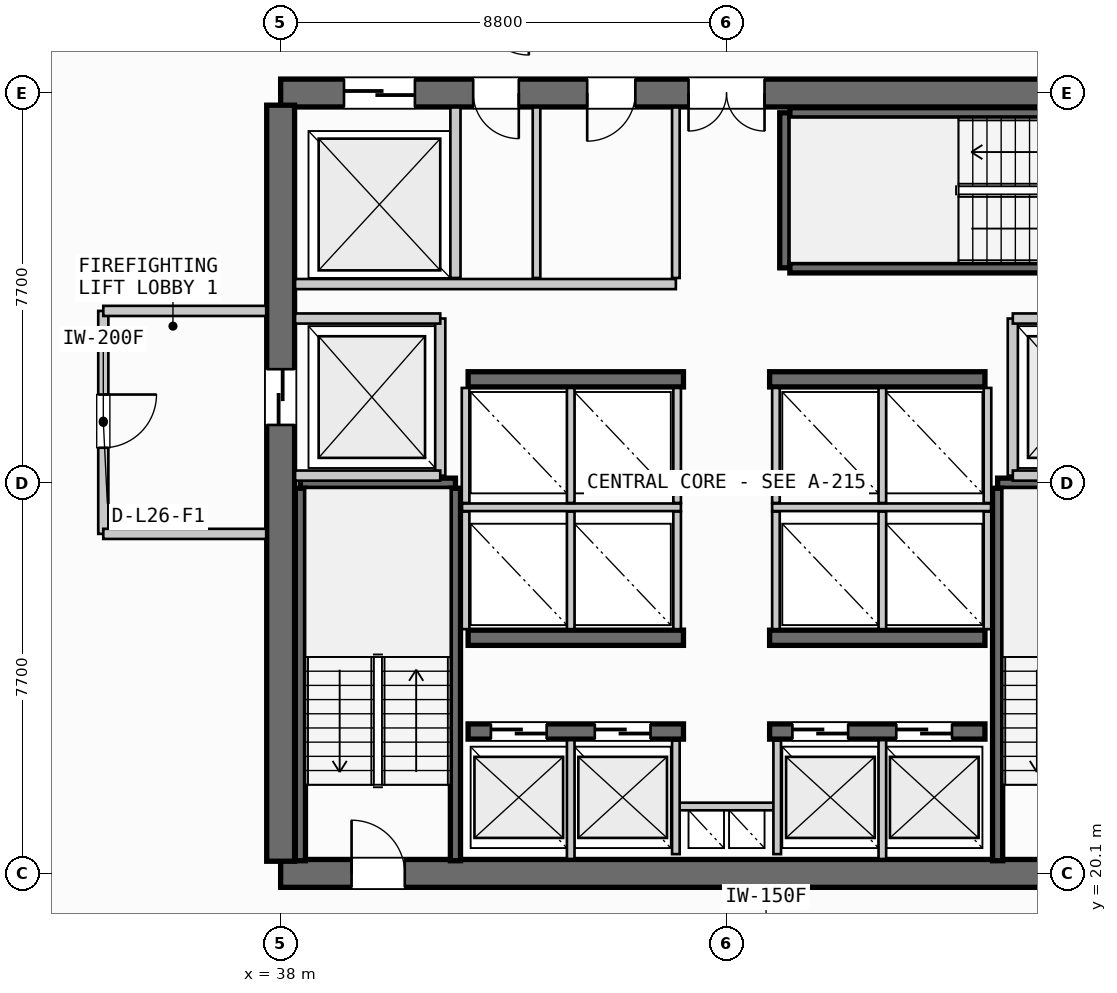
"""IFC4 building model, lengths in metres.
Left out: names, types, materials, properties, quantities, classifications, styles, units other than length and angle.
Written with IfcOpenShell. Run it as: python <this file> out.ifc"""

import sys

from ifc_helpers import new_model, si_unit, direction, frame, frame_2d, origin, place, context, subcontext, project, spatial, rectangle, extrude, source, transform, mapped, element, fill, save


model = new_model("IFC4")
c1 = context("Model", 3, precision=1e-05, world=origin(), true_north=direction((0.0, 1.0)))
c2 = subcontext(c1, "Body", "Model", "MODEL_VIEW")
j1 = project(units=[si_unit("LENGTHUNIT", "METRE"), si_unit("PLANEANGLEUNIT", "RADIAN")], contexts=[c1])
p1 = place(None, origin())
s1 = spatial("IfcSite", under=j1, at=p1, CompositionType="ELEMENT")
p2 = place(p1, origin())
s2 = spatial("IfcBuilding", under=s1, at=p2, CompositionType="ELEMENT")
p3 = place(p2, frame((0.0, 0.0, 107.2)))
s3 = spatial("IfcBuildingStorey", under=s2, at=p3, CompositionType="ELEMENT", Elevation=107.2)
p4 = place(p3, frame((38.0, 20.1, 0.0), z_axis=(0.0, 0.0, 1.0), x_axis=(1.0, 0.0, 0.0)))
e1 = element("IfcWall", 1, at=p4, inside=s3, PredefinedType="SHEAR", context=c2, shape_type="SweptSolid", body=[
    extrude(rectangle(XDim=17.6, YDim=0.55, at=frame_2d((8.8, 0.0))), origin(), (0.0, 0.0, 1.0), 3.35),
])
p5 = place(p4, frame((1.4, 0.0, 0.0)))
e2 = element("IfcOpeningElement", 2, at=p5, cuts=e1, PredefinedType="OPENING", context=c2, shape_type="SweptSolid", body=[
    extrude(rectangle(XDim=1.05, YDim=2.15, at=frame_2d((0.525, 1.075))), frame((0.0, 0.285, 0.0), z_axis=(0.0, -1.0, 0.0), x_axis=(1.0, 0.0, 0.0)), (0.0, 0.0, 1.0), 0.57),
])
p6 = place(p4, frame((15.15, 0.0, 0.0)))
e3 = element("IfcOpeningElement", 3, at=p6, cuts=e1, PredefinedType="OPENING", context=c2, shape_type="SweptSolid", body=[
    extrude(rectangle(XDim=1.05, YDim=2.15, at=frame_2d((0.525, 1.075))), frame((0.0, 0.285, 0.0), z_axis=(0.0, -1.0, 0.0), x_axis=(1.0, 0.0, 0.0)), (0.0, 0.0, 1.0), 0.57),
])
p7 = place(p3, frame((55.6, 35.5, 0.0), z_axis=(0.0, 0.0, 1.0), x_axis=(-1.0, 0.0, 0.0)))
e4 = element("IfcWall", 4, at=p7, inside=s3, PredefinedType="SHEAR", context=c2, shape_type="SweptSolid", body=[
    extrude(rectangle(XDim=17.6, YDim=0.55, at=frame_2d((8.8, 0.0))), origin(), (0.0, 0.0, 1.0), 3.35),
])
p8 = place(p7, frame((8.05, 0.0, 0.0)))
e5 = element("IfcOpeningElement", 5, at=p8, cuts=e4, PredefinedType="OPENING", context=c2, shape_type="SweptSolid", body=[
    extrude(rectangle(XDim=1.5, YDim=2.2, at=frame_2d((0.75, 1.1))), frame((0.0, 0.285, 0.0), z_axis=(0.0, -1.0, 0.0), x_axis=(1.0, 0.0, 0.0)), (0.0, 0.0, 1.0), 0.57),
])
p9 = place(p7, frame((14.95, 0.0, 0.0)))
e6 = element("IfcOpeningElement", 6, at=p9, cuts=e4, PredefinedType="OPENING", context=c2, shape_type="SweptSolid", body=[
    extrude(rectangle(XDim=1.4, YDim=2.3, at=frame_2d((0.7, 1.15))), frame((0.0, 0.285, 0.0), z_axis=(0.0, -1.0, 0.0), x_axis=(1.0, 0.0, 0.0)), (0.0, 0.0, 1.0), 0.57),
])
p10 = place(p7, frame((12.9, 0.0, 0.0)))
e7 = element("IfcOpeningElement", 7, at=p10, cuts=e4, PredefinedType="OPENING", context=c2, shape_type="SweptSolid", body=[
    extrude(rectangle(XDim=0.9, YDim=2.15, at=frame_2d((0.45, 1.075))), frame((0.0, 0.285, 0.0), z_axis=(0.0, -1.0, 0.0), x_axis=(1.0, 0.0, 0.0)), (0.0, 0.0, 1.0), 0.57),
])
p11 = place(p7, frame((10.6, 0.0, 0.0)))
e8 = element("IfcOpeningElement", 8, at=p11, cuts=e4, PredefinedType="OPENING", context=c2, shape_type="SweptSolid", body=[
    extrude(rectangle(XDim=0.95, YDim=2.15, at=frame_2d((0.475, 1.075))), frame((0.0, 0.285, 0.0), z_axis=(0.0, -1.0, 0.0), x_axis=(1.0, 0.0, 0.0)), (0.0, 0.0, 1.0), 0.57),
])
p12 = place(p3, frame((38.0, 35.26, 0.0), z_axis=(0.0, 0.0, 1.0), x_axis=(0.0, -1.0, 0.0)))
e9 = element("IfcWall", 9, at=p12, inside=s3, PredefinedType="SHEAR", context=c2, shape_type="SweptSolid", body=[
    extrude(rectangle(XDim=14.92, YDim=0.55, at=frame_2d((7.46, 0.0))), origin(), (0.0, 0.0, 1.0), 3.35),
])
p13 = place(p12, frame((5.21, 0.0, 0.0)))
e10 = element("IfcOpeningElement", 10, at=p13, cuts=e9, PredefinedType="OPENING", context=c2, shape_type="SweptSolid", body=[
    extrude(rectangle(XDim=1.1, YDim=2.2, at=frame_2d((0.55, 1.1))), frame((0.0, 0.285, 0.0), z_axis=(0.0, -1.0, 0.0), x_axis=(1.0, 0.0, 0.0)), (0.0, 0.0, 1.0), 0.57),
])
p14 = place(p3, frame((41.7, 22.9, 0.0), z_axis=(0.0, 0.0, 1.0), x_axis=(1.0, 0.0, 0.0)))
e11 = element("IfcWall", 11, at=p14, inside=s3, PredefinedType="SHEAR", context=c2, shape_type="SweptSolid", body=[
    extrude(rectangle(XDim=4.25, YDim=0.3, at=frame_2d((2.125, 0.0))), origin(), (0.0, 0.0, 1.0), 3.35),
])
p15 = place(p14, frame((0.45, 0.0, 0.0)))
e12 = element("IfcOpeningElement", 12, at=p15, cuts=e11, PredefinedType="OPENING", context=c2, shape_type="SweptSolid", body=[
    extrude(rectangle(XDim=1.1, YDim=2.2, at=frame_2d((0.55, 1.1))), frame((0.0, 0.16, 0.0), z_axis=(0.0, -1.0, 0.0), x_axis=(1.0, 0.0, 0.0)), (0.0, 0.0, 1.0), 0.32),
])
p16 = place(p14, frame((2.5, 0.0, 0.0)))
e13 = element("IfcOpeningElement", 13, at=p16, cuts=e11, PredefinedType="OPENING", context=c2, shape_type="SweptSolid", body=[
    extrude(rectangle(XDim=1.1, YDim=2.2, at=frame_2d((0.55, 1.1))), frame((0.0, 0.16, 0.0), z_axis=(0.0, -1.0, 0.0), x_axis=(1.0, 0.0, 0.0)), (0.0, 0.0, 1.0), 0.32),
])
p17 = place(p3, frame((47.65, 22.9, 0.0), z_axis=(0.0, 0.0, 1.0), x_axis=(1.0, 0.0, 0.0)))
e14 = element("IfcWall", 14, at=p17, inside=s3, PredefinedType="SHEAR", context=c2, shape_type="SweptSolid", body=[
    extrude(rectangle(XDim=4.25, YDim=0.3, at=frame_2d((2.125, 0.0))), origin(), (0.0, 0.0, 1.0), 3.35),
])
p18 = place(p17, frame((0.45, 0.0, 0.0)))
e15 = element("IfcOpeningElement", 15, at=p18, cuts=e14, PredefinedType="OPENING", context=c2, shape_type="SweptSolid", body=[
    extrude(rectangle(XDim=1.1, YDim=2.2, at=frame_2d((0.55, 1.1))), frame((0.0, 0.16, 0.0), z_axis=(0.0, -1.0, 0.0), x_axis=(1.0, 0.0, 0.0)), (0.0, 0.0, 1.0), 0.32),
])
p19 = place(p17, frame((2.5, 0.0, 0.0)))
e16 = element("IfcOpeningElement", 16, at=p19, cuts=e14, PredefinedType="OPENING", context=c2, shape_type="SweptSolid", body=[
    extrude(rectangle(XDim=1.1, YDim=2.2, at=frame_2d((0.55, 1.1))), frame((0.0, 0.16, 0.0), z_axis=(0.0, -1.0, 0.0), x_axis=(1.0, 0.0, 0.0)), (0.0, 0.0, 1.0), 0.32),
])
for number, where, z_axis, x_axis in (
    (17, (41.7, 24.75, 0.0), (0.0, 0.0, 1.0), (1.0, 0.0, 0.0)),
    (18, (47.65, 24.75, 0.0), (0.0, 0.0, 1.0), (1.0, 0.0, 0.0)),
    (19, (41.7, 29.85, 0.0), (0.0, 0.0, 1.0), (1.0, 0.0, 0.0)),
    (20, (47.65, 29.85, 0.0), (0.0, 0.0, 1.0), (1.0, 0.0, 0.0)),
):
    element("IfcWall", number, at=place(p3, frame(where, z_axis=z_axis, x_axis=x_axis)), inside=s3, PredefinedType="SHEAR", context=c2, shape_type="SweptSolid", body=[
        extrude(rectangle(XDim=4.25, YDim=0.3, at=frame_2d((2.125, 0.0))), origin(), (0.0, 0.0, 1.0), 3.35),
    ])
p20 = place(p3, frame((38.39, 27.8, 0.0), z_axis=(0.0, 0.0, 1.0), x_axis=(1.0, 0.0, 0.0)))
e21 = element("IfcWall", 21, at=p20, inside=s3, PredefinedType="SHEAR", context=c2, shape_type="SweptSolid", body=[
    extrude(rectangle(XDim=3.06, YDim=0.2, at=frame_2d((1.53, 0.0))), origin(), (0.0, 0.0, 1.0), 3.35),
])
for number, where, z_axis, x_axis in (
    (22, (41.45, 27.7, 0.0), (0.0, 0.0, 1.0), (0.0, -1.0, 0.0)),
    (23, (38.39, 20.35, 0.0), (0.0, 0.0, 1.0), (0.0, 1.0, 0.0)),
):
    element("IfcWall", number, at=place(p3, frame(where, z_axis=z_axis, x_axis=x_axis)), inside=s3, PredefinedType="SHEAR", context=c2, shape_type="SweptSolid", body=[
        extrude(rectangle(XDim=7.35, YDim=0.2, at=frame_2d((3.675, 0.0))), origin(), (0.0, 0.0, 1.0), 3.35),
    ])
p21 = place(p3, frame((52.15, 27.8, 0.0), z_axis=(0.0, 0.0, 1.0), x_axis=(1.0, 0.0, 0.0)))
e24 = element("IfcWall", 24, at=p21, inside=s3, PredefinedType="SHEAR", context=c2, shape_type="SweptSolid", body=[
    extrude(rectangle(XDim=3.06, YDim=0.2, at=frame_2d((1.53, 0.0))), origin(), (0.0, 0.0, 1.0), 3.35),
])
p22 = place(p3, frame((52.15, 20.35, 0.0), z_axis=(0.0, 0.0, 1.0), x_axis=(0.0, 1.0, 0.0)))
e25 = element("IfcWall", 25, at=p22, inside=s3, PredefinedType="SHEAR", context=c2, shape_type="SweptSolid", body=[
    extrude(rectangle(XDim=7.35, YDim=0.2, at=frame_2d((3.675, 0.0))), origin(), (0.0, 0.0, 1.0), 3.35),
])
p23 = place(p3, frame((47.95, 32.05, 0.0), z_axis=(0.0, 0.0, 1.0), x_axis=(0.0, 1.0, 0.0)))
e26 = element("IfcWall", 26, at=p23, inside=s3, PredefinedType="SHEAR", context=c2, shape_type="SweptSolid", body=[
    extrude(rectangle(XDim=3.06, YDim=0.2, at=frame_2d((1.53, 0.0))), origin(), (0.0, 0.0, 1.0), 3.35),
])
for number, where, z_axis, x_axis in (
    (27, (48.05, 35.11, 0.0), (0.0, 0.0, 1.0), (1.0, 0.0, 0.0)),
    (28, (55.4, 32.05, 0.0), (0.0, 0.0, 1.0), (-1.0, 0.0, 0.0)),
):
    element("IfcWall", number, at=place(p3, frame(where, z_axis=z_axis, x_axis=x_axis)), inside=s3, PredefinedType="SHEAR", context=c2, shape_type="SweptSolid", body=[
        extrude(rectangle(XDim=7.35, YDim=0.2, at=frame_2d((3.675, 0.0))), origin(), (0.0, 0.0, 1.0), 3.35),
    ])
p24 = place(p3, frame((45.8, 21.42, 0.0), z_axis=(0.0, 0.0, 1.0), x_axis=(1.0, 0.0, 0.0)))
e29 = element("IfcWall", 29, at=p24, inside=s3, PredefinedType="PARTITIONING", context=c2, shape_type="SweptSolid", body=[
    extrude(rectangle(XDim=2.0, YDim=0.15, at=frame_2d((1.0, 0.0))), origin(), (0.0, 0.0, 1.0), 2.28),
])
for number, where, z_axis, x_axis in (
    (30, (45.8, 20.48, 0.0), (0.0, 0.0, 1.0), (0.0, 1.0, 0.0)),
    (31, (47.8, 20.48, 0.0), (0.0, 0.0, 1.0), (0.0, 1.0, 0.0)),
):
    element("IfcWall", number, at=place(p3, frame(where, z_axis=z_axis, x_axis=x_axis)), inside=s3, PredefinedType="PARTITIONING", context=c2, shape_type="SweptSolid", body=[
        extrude(rectangle(XDim=2.24, YDim=0.15, at=frame_2d((1.12, 0.0))), origin(), (0.0, 0.0, 1.0), 2.28),
    ])
p25 = place(p3, frame((41.15, 27.95, 0.0), z_axis=(0.0, 0.0, 1.0), x_axis=(0.0, 1.0, 0.0)))
e32 = element("IfcWall", 32, at=p25, inside=s3, PredefinedType="PARTITIONING", context=c2, shape_type="SweptSolid", body=[
    extrude(rectangle(XDim=3.1, YDim=0.2, at=frame_2d((1.55, 0.0))), origin(), (0.0, 0.0, 1.0), 2.28),
])
for number, where, z_axis, x_axis in (
    (33, (38.285, 27.95, 0.0), (0.0, 0.0, 1.0), (1.0, 0.0, 0.0)),
    (34, (38.285, 31.05, 0.0), (0.0, 0.0, 1.0), (1.0, 0.0, 0.0)),
):
    element("IfcWall", number, at=place(p3, frame(where, z_axis=z_axis, x_axis=x_axis)), inside=s3, PredefinedType="PARTITIONING", context=c2, shape_type="SweptSolid", body=[
        extrude(rectangle(XDim=2.865, YDim=0.2, at=frame_2d((1.433, 0.0))), origin(), (0.0, 0.0, 1.0), 2.28),
    ])
p26 = place(p3, frame((34.5, 31.2, 0.0), z_axis=(0.0, 0.0, 1.0), x_axis=(0.0, -1.0, 0.0)))
e35 = element("IfcWall", 35, at=p26, inside=s3, PredefinedType="PARTITIONING", context=c2, shape_type="SweptSolid", body=[
    extrude(rectangle(XDim=4.4, YDim=0.2, at=frame_2d((2.2, 0.0))), origin(), (0.0, 0.0, 1.0), 2.28),
])
p27 = place(p26, frame((1.65, 0.0, 0.0)))
e36 = element("IfcOpeningElement", 36, at=p27, cuts=e35, PredefinedType="OPENING", context=c2, shape_type="SweptSolid", body=[
    extrude(rectangle(XDim=1.05, YDim=2.15, at=frame_2d((0.525, 1.075))), frame((0.0, 0.11, 0.0), z_axis=(0.0, -1.0, 0.0), x_axis=(1.0, 0.0, 0.0)), (0.0, 0.0, 1.0), 0.22),
])
for number, where, z_axis, x_axis in (
    (37, (34.5, 26.8, 0.0), (0.0, 0.0, 1.0), (1.0, 0.0, 0.0)),
    (38, (34.5, 31.2, 0.0), (0.0, 0.0, 1.0), (1.0, 0.0, 0.0)),
):
    element("IfcWall", number, at=place(p3, frame(where, z_axis=z_axis, x_axis=x_axis)), inside=s3, PredefinedType="PARTITIONING", context=c2, shape_type="SweptSolid", body=[
        extrude(rectangle(XDim=3.215, YDim=0.2, at=frame_2d((1.607, 0.0))), origin(), (0.0, 0.0, 1.0), 2.28),
    ])
p28 = place(p3, frame((52.45, 27.95, 0.0), z_axis=(0.0, 0.0, 1.0), x_axis=(0.0, 1.0, 0.0)))
e39 = element("IfcWall", 39, at=p28, inside=s3, PredefinedType="PARTITIONING", context=c2, shape_type="SweptSolid", body=[
    extrude(rectangle(XDim=3.1, YDim=0.2, at=frame_2d((1.55, 0.0))), origin(), (0.0, 0.0, 1.0), 2.28),
])
for number, where, z_axis, x_axis in (
    (40, (52.45, 27.95, 0.0), (0.0, 0.0, 1.0), (1.0, 0.0, 0.0)),
    (41, (52.45, 31.05, 0.0), (0.0, 0.0, 1.0), (1.0, 0.0, 0.0)),
):
    element("IfcWall", number, at=place(p3, frame(where, z_axis=z_axis, x_axis=x_axis)), inside=s3, PredefinedType="PARTITIONING", context=c2, shape_type="SweptSolid", body=[
        extrude(rectangle(XDim=2.865, YDim=0.2, at=frame_2d((1.433, 0.0))), origin(), (0.0, 0.0, 1.0), 2.28),
    ])
for number, where, z_axis, x_axis in (
    (42, (43.725, 20.385, 0.0), (0.0, 0.0, 1.0), (0.0, 1.0, 0.0)),
    (43, (49.875, 20.385, 0.0), (0.0, 0.0, 1.0), (0.0, 1.0, 0.0)),
):
    element("IfcWall", number, at=place(p3, frame(where, z_axis=z_axis, x_axis=x_axis)), inside=s3, PredefinedType="PARTITIONING", context=c2, shape_type="SweptSolid", body=[
        extrude(rectangle(XDim=2.345, YDim=0.15, at=frame_2d((1.172, 0.0))), origin(), (0.0, 0.0, 1.0), 2.28),
    ])
p29 = place(p3, frame((41.58, 27.325, 0.0), z_axis=(0.0, 0.0, 1.0), x_axis=(1.0, 0.0, 0.0)))
e44 = element("IfcWall", 44, at=p29, inside=s3, PredefinedType="PARTITIONING", context=c2, shape_type="SweptSolid", body=[
    extrude(rectangle(XDim=4.32, YDim=0.15, at=frame_2d((2.16, 0.0))), origin(), (0.0, 0.0, 1.0), 2.28),
])
p30 = place(p3, frame((47.7, 27.325, 0.0), z_axis=(0.0, 0.0, 1.0), x_axis=(1.0, 0.0, 0.0)))
e45 = element("IfcWall", 45, at=p30, inside=s3, PredefinedType="PARTITIONING", context=c2, shape_type="SweptSolid", body=[
    extrude(rectangle(XDim=4.32, YDim=0.15, at=frame_2d((2.16, 0.0))), origin(), (0.0, 0.0, 1.0), 2.28),
])
for number, where, z_axis, x_axis in (
    (46, (41.65, 24.92, 0.0), (0.0, 0.0, 1.0), (0.0, 1.0, 0.0)),
    (47, (43.725, 24.92, 0.0), (0.0, 0.0, 1.0), (0.0, 1.0, 0.0)),
    (48, (45.825, 24.92, 0.0), (0.0, 0.0, 1.0), (0.0, 1.0, 0.0)),
    (49, (47.775, 24.92, 0.0), (0.0, 0.0, 1.0), (0.0, 1.0, 0.0)),
    (50, (49.875, 24.92, 0.0), (0.0, 0.0, 1.0), (0.0, 1.0, 0.0)),
    (51, (51.95, 24.92, 0.0), (0.0, 0.0, 1.0), (0.0, 1.0, 0.0)),
):
    element("IfcWall", number, at=place(p3, frame(where, z_axis=z_axis, x_axis=x_axis)), inside=s3, PredefinedType="PARTITIONING", context=c2, shape_type="SweptSolid", body=[
        extrude(rectangle(XDim=2.32, YDim=0.15, at=frame_2d((1.16, 0.0))), origin(), (0.0, 0.0, 1.0), 2.28),
    ])
for number, where, z_axis, x_axis in (
    (52, (41.65, 27.41, 0.0), (0.0, 0.0, 1.0), (0.0, 1.0, 0.0)),
    (53, (43.725, 27.41, 0.0), (0.0, 0.0, 1.0), (0.0, 1.0, 0.0)),
    (54, (45.825, 27.41, 0.0), (0.0, 0.0, 1.0), (0.0, 1.0, 0.0)),
    (55, (47.775, 27.41, 0.0), (0.0, 0.0, 1.0), (0.0, 1.0, 0.0)),
    (56, (49.875, 27.41, 0.0), (0.0, 0.0, 1.0), (0.0, 1.0, 0.0)),
    (57, (51.95, 27.41, 0.0), (0.0, 0.0, 1.0), (0.0, 1.0, 0.0)),
):
    element("IfcWall", number, at=place(p3, frame(where, z_axis=z_axis, x_axis=x_axis)), inside=s3, PredefinedType="PARTITIONING", context=c2, shape_type="SweptSolid", body=[
        extrude(rectangle(XDim=2.27, YDim=0.15, at=frame_2d((1.135, 0.0))), origin(), (0.0, 0.0, 1.0), 2.28),
    ])
p31 = place(p3, frame((41.45, 31.85, 0.0), z_axis=(0.0, 0.0, 1.0), x_axis=(0.0, 1.0, 0.0)))
e58 = element("IfcWall", 58, at=p31, inside=s3, PredefinedType="PARTITIONING", context=c2, shape_type="SweptSolid", body=[
    extrude(rectangle(XDim=3.365, YDim=0.2, at=frame_2d((1.683, 0.0))), origin(), (0.0, 0.0, 1.0), 2.28),
])
p32 = place(p3, frame((38.285, 31.73, 0.0), z_axis=(0.0, 0.0, 1.0), x_axis=(1.0, 0.0, 0.0)))
e59 = element("IfcWall", 59, at=p32, inside=s3, PredefinedType="PARTITIONING", context=c2, shape_type="SweptSolid", body=[
    extrude(rectangle(XDim=7.515, YDim=0.2, at=frame_2d((3.758, 0.0))), origin(), (0.0, 0.0, 1.0), 2.28),
])
p33 = place(p3, frame((45.8, 31.85, 0.0), z_axis=(0.0, 0.0, 1.0), x_axis=(0.0, 1.0, 0.0)))
e60 = element("IfcWall", 60, at=p33, inside=s3, PredefinedType="PARTITIONING", context=c2, shape_type="SweptSolid", body=[
    extrude(rectangle(XDim=3.365, YDim=0.15, at=frame_2d((1.683, 0.0))), origin(), (0.0, 0.0, 1.0), 2.28),
])
p34 = place(p3, frame((43.05, 31.85, 0.0), z_axis=(0.0, 0.0, 1.0), x_axis=(0.0, 1.0, 0.0)))
e61 = element("IfcWall", 61, at=p34, inside=s3, PredefinedType="PLUMBINGWALL", context=c2, shape_type="SweptSolid", body=[
    extrude(rectangle(XDim=3.365, YDim=0.15, at=frame_2d((1.683, 0.0))), origin(), (0.0, 0.0, 1.0), 2.28),
])
m1 = source(origin(), c2, "Body", "SweptSolid", [
    extrude(rectangle(XDim=1.05, YDim=2.15, at=frame_2d((0.525, 1.075))), frame((0.0, 0.025, 0.0), z_axis=(0.0, -1.0, 0.0), x_axis=(1.0, 0.0, 0.0)), (0.0, 0.0, 1.0), 0.05),
])
p35 = place(p5, origin())
e62 = element("IfcDoor", 62, at=p35, inside=s3, OperationType="SINGLE_SWING_LEFT", PredefinedType="DOOR", context=c2, shape_type="MappedRepresentation", body=[
    mapped(m1, transform((0.0, 0.0, 0.0), scale=1.0)),
])
fill(e2, e62)
m2 = source(origin(), c2, "Body", "SweptSolid", [
    extrude(rectangle(XDim=1.5, YDim=2.2, at=frame_2d((0.75, 1.1))), frame((0.0, 0.025, 0.0), z_axis=(0.0, -1.0, 0.0), x_axis=(1.0, 0.0, 0.0)), (0.0, 0.0, 1.0), 0.05),
])
p36 = place(p8, origin())
e63 = element("IfcDoor", 63, at=p36, inside=s3, OperationType="DOUBLE_DOOR_SINGLE_SWING", PredefinedType="DOOR", context=c2, shape_type="MappedRepresentation", body=[
    mapped(m2, transform((0.0, 0.0, 0.0), scale=1.0)),
])
fill(e5, e63)
m3 = source(origin(), c2, "Body", "SweptSolid", [
    extrude(rectangle(XDim=1.1, YDim=2.2, at=frame_2d((0.55, 1.1))), frame((0.0, 0.025, 0.0), z_axis=(0.0, -1.0, 0.0), x_axis=(1.0, 0.0, 0.0)), (0.0, 0.0, 1.0), 0.05),
])
p37 = place(p13, origin())
e64 = element("IfcDoor", 64, at=p37, inside=s3, OperationType="SLIDING_TO_LEFT", PredefinedType="DOOR", context=c2, shape_type="MappedRepresentation", body=[
    mapped(m3, transform((0.0, 0.0, 0.0), scale=1.0)),
])
fill(e10, e64)
p38 = place(p15, origin())
e65 = element("IfcDoor", 65, at=p38, inside=s3, OperationType="SLIDING_TO_LEFT", PredefinedType="DOOR", context=c2, shape_type="MappedRepresentation", body=[
    mapped(m3, transform((0.0, 0.0, 0.0), scale=1.0)),
])
fill(e12, e65)
p39 = place(p16, origin())
e66 = element("IfcDoor", 66, at=p39, inside=s3, OperationType="SLIDING_TO_LEFT", PredefinedType="DOOR", context=c2, shape_type="MappedRepresentation", body=[
    mapped(m3, transform((0.0, 0.0, 0.0), scale=1.0)),
])
fill(e13, e66)
p40 = place(p18, origin())
e67 = element("IfcDoor", 67, at=p40, inside=s3, OperationType="SLIDING_TO_LEFT", PredefinedType="DOOR", context=c2, shape_type="MappedRepresentation", body=[
    mapped(m3, transform((0.0, 0.0, 0.0), scale=1.0)),
])
fill(e15, e67)
p41 = place(p19, origin())
e68 = element("IfcDoor", 68, at=p41, inside=s3, OperationType="SLIDING_TO_LEFT", PredefinedType="DOOR", context=c2, shape_type="MappedRepresentation", body=[
    mapped(m3, transform((0.0, 0.0, 0.0), scale=1.0)),
])
fill(e16, e68)
m4 = source(origin(), c2, "Body", "SweptSolid", [
    extrude(rectangle(XDim=1.4, YDim=2.3, at=frame_2d((0.7, 1.15))), frame((0.0, 0.025, 0.0), z_axis=(0.0, -1.0, 0.0), x_axis=(1.0, 0.0, 0.0)), (0.0, 0.0, 1.0), 0.05),
])
p42 = place(p9, origin())
e69 = element("IfcDoor", 69, at=p42, inside=s3, OperationType="SLIDING_TO_RIGHT", PredefinedType="DOOR", context=c2, shape_type="MappedRepresentation", body=[
    mapped(m4, transform((0.0, 0.0, 0.0), scale=1.0)),
])
fill(e6, e69)
m5 = source(origin(), c2, "Body", "SweptSolid", [
    extrude(rectangle(XDim=0.9, YDim=2.15, at=frame_2d((0.45, 1.075))), frame((0.0, 0.025, 0.0), z_axis=(0.0, -1.0, 0.0), x_axis=(1.0, 0.0, 0.0)), (0.0, 0.0, 1.0), 0.05),
])
p43 = place(p10, origin())
e70 = element("IfcDoor", 70, at=p43, inside=s3, OperationType="SINGLE_SWING_LEFT", PredefinedType="DOOR", context=c2, shape_type="MappedRepresentation", body=[
    mapped(m5, transform((0.0, 0.0, 0.0), scale=1.0)),
])
fill(e7, e70)
m6 = source(origin(), c2, "Body", "SweptSolid", [
    extrude(rectangle(XDim=0.95, YDim=2.15, at=frame_2d((0.475, 1.075))), frame((0.0, 0.025, 0.0), z_axis=(0.0, -1.0, 0.0), x_axis=(1.0, 0.0, 0.0)), (0.0, 0.0, 1.0), 0.05),
])
p44 = place(p11, origin())
e71 = element("IfcDoor", 71, at=p44, inside=s3, OperationType="SINGLE_SWING_RIGHT", PredefinedType="DOOR", context=c2, shape_type="MappedRepresentation", body=[
    mapped(m6, transform((0.0, 0.0, 0.0), scale=1.0)),
])
fill(e8, e71)
p45 = place(p27, origin())
e72 = element("IfcDoor", 72, at=p45, inside=s3, OperationType="SINGLE_SWING_LEFT", PredefinedType="DOOR", context=c2, shape_type="MappedRepresentation", body=[
    mapped(m1, transform((0.0, 0.0, 0.0), scale=1.0)),
])
fill(e36, e72)
save(model, sys.argv[1])
